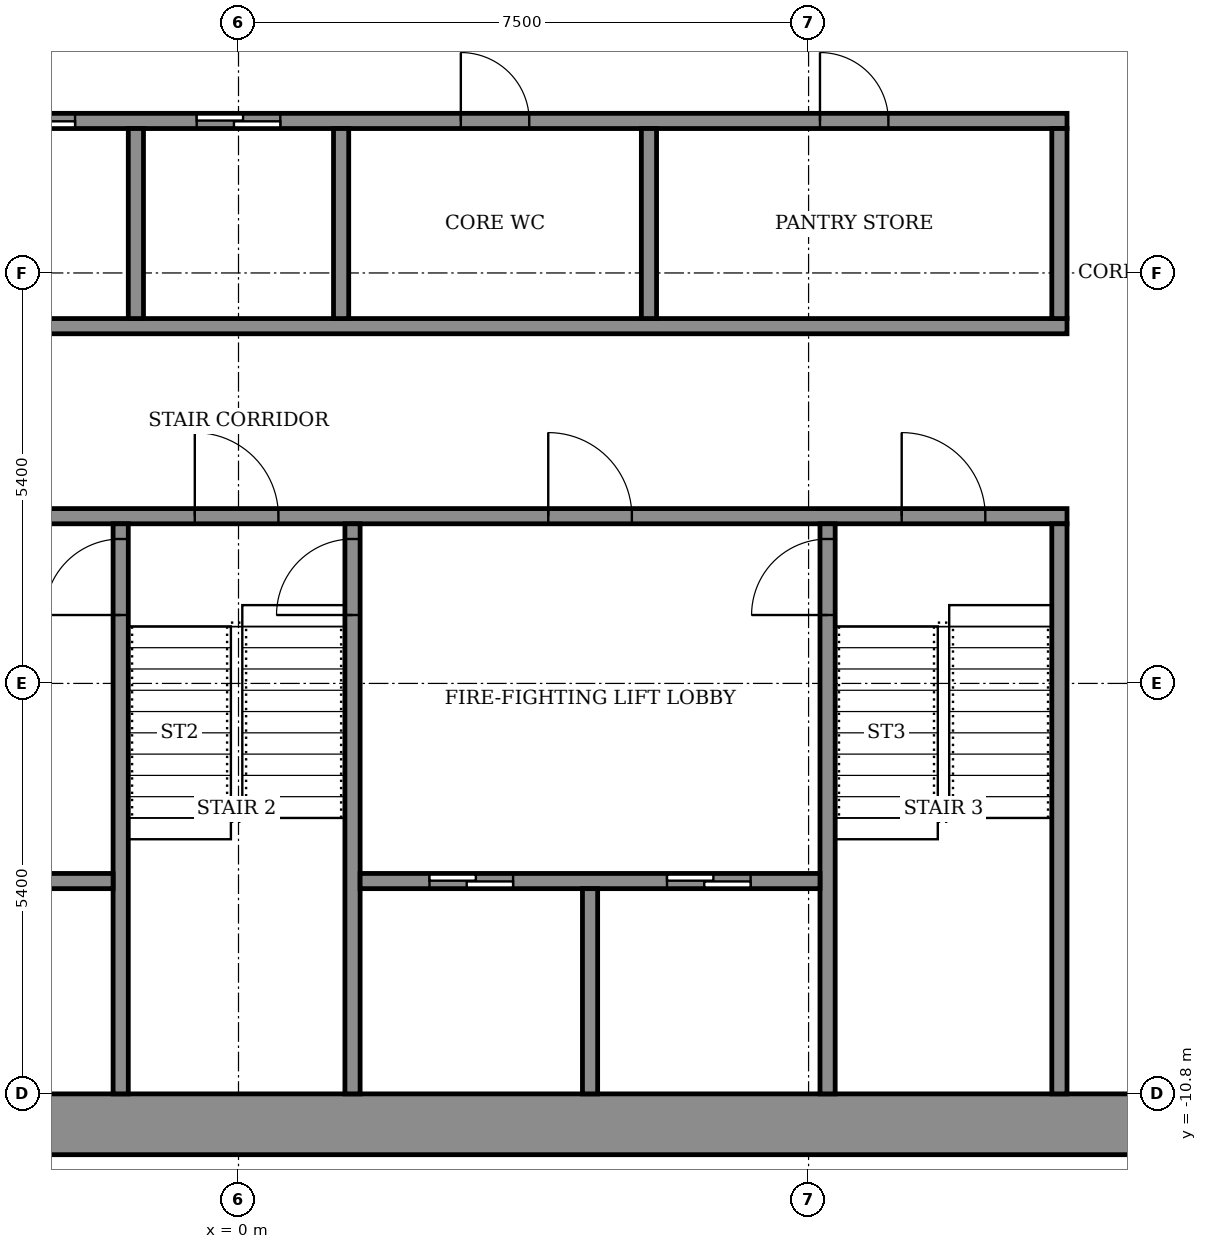
"""IFC4 building model, lengths in metres.
Left out: names, types, materials, properties, quantities, classifications, styles, units other than length and angle.
Written with IfcOpenShell. Run it as: python <this file> out.ifc"""

import sys

from ifc_helpers import new_model, si_unit, direction, frame, frame_2d, origin, place, context, subcontext, project, spatial, rectangle, extrude, element, fill, save


model = new_model("IFC4")
c1 = context("Model", 3, precision=1e-05, world=origin(), true_north=direction((0.0, 1.0)))
c2 = subcontext(c1, "Body", "Model", "MODEL_VIEW")
j1 = project(units=[si_unit("LENGTHUNIT", "METRE"), si_unit("PLANEANGLEUNIT", "RADIAN")], contexts=[c1])
p1 = place(None, origin())
s1 = spatial("IfcSite", under=j1, at=p1, CompositionType="ELEMENT")
p2 = place(p1, origin())
s2 = spatial("IfcBuilding", under=s1, at=p2, CompositionType="ELEMENT")
p3 = place(p2, frame((0.0, 0.0, 238.3)))
s3 = spatial("IfcBuildingStorey", under=s2, at=p3, CompositionType="ELEMENT", Elevation=238.3)
p4 = place(p3, frame((-14.6, -11.2, 0.0), z_axis=(0.0, 0.0, 1.0), x_axis=(1.0, 0.0, 0.0)))
e1 = element("IfcWall", 1, at=p4, inside=s3, PredefinedType="SHEAR", context=c2, shape_type="SweptSolid", body=[
    extrude(rectangle(XDim=29.2, YDim=0.8, at=frame_2d((14.6, 0.0))), origin(), (0.0, 0.0, 1.0), 3.6),
])
p5 = place(p3, frame((-10.9, -3.2, 0.0), z_axis=(0.0, 0.0, 1.0), x_axis=(1.0, 0.0, 0.0)))
e2 = element("IfcWall", 2, at=p5, inside=s3, PredefinedType="SHEAR", context=c2, shape_type="SweptSolid", body=[
    extrude(rectangle(XDim=21.8, YDim=0.2, at=frame_2d((10.9, 0.0))), origin(), (0.0, 0.0, 1.0), 3.05),
])
p6 = place(p5, frame((1.075, 0.0, 0.0)))
e3 = element("IfcOpeningElement", 3, at=p6, cuts=e2, PredefinedType="OPENING", context=c2, shape_type="SweptSolid", body=[
    extrude(rectangle(XDim=1.1, YDim=2.1, at=frame_2d((0.55, 1.05))), frame((0.0, 0.11, 0.0), z_axis=(0.0, -1.0, 0.0), x_axis=(1.0, 0.0, 0.0)), (0.0, 0.0, 1.0), 0.22),
])
p7 = place(p5, frame((10.325, 0.0, 0.0)))
e4 = element("IfcOpeningElement", 4, at=p7, cuts=e2, PredefinedType="OPENING", context=c2, shape_type="SweptSolid", body=[
    extrude(rectangle(XDim=1.1, YDim=2.1, at=frame_2d((0.55, 1.05))), frame((0.0, 0.11, 0.0), z_axis=(0.0, -1.0, 0.0), x_axis=(1.0, 0.0, 0.0)), (0.0, 0.0, 1.0), 0.22),
])
p8 = place(p5, frame((19.625, 0.0, 0.0)))
e5 = element("IfcOpeningElement", 5, at=p8, cuts=e2, PredefinedType="OPENING", context=c2, shape_type="SweptSolid", body=[
    extrude(rectangle(XDim=1.1, YDim=2.1, at=frame_2d((0.55, 1.05))), frame((0.0, 0.11, 0.0), z_axis=(0.0, -1.0, 0.0), x_axis=(1.0, 0.0, 0.0)), (0.0, 0.0, 1.0), 0.22),
])
p9 = place(p5, frame((5.7, 0.0, 0.0)))
e6 = element("IfcOpeningElement", 6, at=p9, cuts=e2, PredefinedType="OPENING", context=c2, shape_type="SweptSolid", body=[
    extrude(rectangle(XDim=1.1, YDim=2.1, at=frame_2d((0.55, 1.05))), frame((0.0, 0.11, 0.0), z_axis=(0.0, -1.0, 0.0), x_axis=(1.0, 0.0, 0.0)), (0.0, 0.0, 1.0), 0.22),
])
p10 = place(p5, frame((14.975, 0.0, 0.0)))
e7 = element("IfcOpeningElement", 7, at=p10, cuts=e2, PredefinedType="OPENING", context=c2, shape_type="SweptSolid", body=[
    extrude(rectangle(XDim=1.1, YDim=2.1, at=frame_2d((0.55, 1.05))), frame((0.0, 0.11, 0.0), z_axis=(0.0, -1.0, 0.0), x_axis=(1.0, 0.0, 0.0)), (0.0, 0.0, 1.0), 0.22),
])
p11 = place(p3, frame((-10.9, -0.7, 0.0), z_axis=(0.0, 0.0, 1.0), x_axis=(1.0, 0.0, 0.0)))
e8 = element("IfcWall", 8, at=p11, inside=s3, PredefinedType="SHEAR", context=c2, shape_type="SweptSolid", body=[
    extrude(rectangle(XDim=21.8, YDim=0.2, at=frame_2d((10.9, 0.0))), origin(), (0.0, 0.0, 1.0), 3.05),
])
p12 = place(p3, frame((-10.9, 2.0, 0.0), z_axis=(0.0, 0.0, 1.0), x_axis=(1.0, 0.0, 0.0)))
e9 = element("IfcWall", 9, at=p12, inside=s3, PredefinedType="SHEAR", context=c2, shape_type="SweptSolid", body=[
    extrude(rectangle(XDim=21.8, YDim=0.2, at=frame_2d((10.9, 0.0))), origin(), (0.0, 0.0, 1.0), 3.05),
])
p13 = place(p12, frame((4.95, 0.0, 0.0)))
e10 = element("IfcOpeningElement", 10, at=p13, cuts=e9, PredefinedType="OPENING", context=c2, shape_type="SweptSolid", body=[
    extrude(rectangle(XDim=1.1, YDim=2.1, at=frame_2d((0.55, 1.05))), frame((0.0, 0.11, 0.0), z_axis=(0.0, -1.0, 0.0), x_axis=(1.0, 0.0, 0.0)), (0.0, 0.0, 1.0), 0.22),
])
p14 = place(p12, frame((7.65, 0.0, 0.0)))
e11 = element("IfcOpeningElement", 11, at=p14, cuts=e9, PredefinedType="OPENING", context=c2, shape_type="SweptSolid", body=[
    extrude(rectangle(XDim=1.1, YDim=2.1, at=frame_2d((0.55, 1.05))), frame((0.0, 0.11, 0.0), z_axis=(0.0, -1.0, 0.0), x_axis=(1.0, 0.0, 0.0)), (0.0, 0.0, 1.0), 0.22),
])
p15 = place(p12, frame((10.35, 0.0, 0.0)))
e12 = element("IfcOpeningElement", 12, at=p15, cuts=e9, PredefinedType="OPENING", context=c2, shape_type="SweptSolid", body=[
    extrude(rectangle(XDim=1.1, YDim=2.1, at=frame_2d((0.55, 1.05))), frame((0.0, 0.11, 0.0), z_axis=(0.0, -1.0, 0.0), x_axis=(1.0, 0.0, 0.0)), (0.0, 0.0, 1.0), 0.22),
])
p16 = place(p12, frame((1.675, 0.0, 0.0)))
e13 = element("IfcOpeningElement", 13, at=p16, cuts=e9, PredefinedType="OPENING", context=c2, shape_type="SweptSolid", body=[
    extrude(rectangle(XDim=0.9, YDim=2.1, at=frame_2d((0.45, 1.05))), frame((0.0, 0.11, 0.0), z_axis=(0.0, -1.0, 0.0), x_axis=(1.0, 0.0, 0.0)), (0.0, 0.0, 1.0), 0.22),
])
p17 = place(p12, frame((13.825, 0.0, 0.0)))
e14 = element("IfcOpeningElement", 14, at=p17, cuts=e9, PredefinedType="OPENING", context=c2, shape_type="SweptSolid", body=[
    extrude(rectangle(XDim=0.9, YDim=2.1, at=frame_2d((0.45, 1.05))), frame((0.0, 0.11, 0.0), z_axis=(0.0, -1.0, 0.0), x_axis=(1.0, 0.0, 0.0)), (0.0, 0.0, 1.0), 0.22),
])
p18 = place(p12, frame((18.55, 0.0, 0.0)))
e15 = element("IfcOpeningElement", 15, at=p18, cuts=e9, PredefinedType="OPENING", context=c2, shape_type="SweptSolid", body=[
    extrude(rectangle(XDim=0.9, YDim=2.1, at=frame_2d((0.45, 1.05))), frame((0.0, 0.11, 0.0), z_axis=(0.0, -1.0, 0.0), x_axis=(1.0, 0.0, 0.0)), (0.0, 0.0, 1.0), 0.22),
])
p19 = place(p3, frame((-1.55, -10.8, 0.0), z_axis=(0.0, 0.0, 1.0), x_axis=(0.0, 1.0, 0.0)))
e16 = element("IfcWall", 16, at=p19, inside=s3, PredefinedType="SHEAR", context=c2, shape_type="SweptSolid", body=[
    extrude(rectangle(XDim=7.5, YDim=0.2, at=frame_2d((3.75, 0.0))), origin(), (0.0, 0.0, 1.0), 3.05),
])
p20 = place(p19, frame((6.3, 0.0, 0.0)))
e17 = element("IfcOpeningElement", 17, at=p20, cuts=e16, PredefinedType="OPENING", context=c2, shape_type="SweptSolid", body=[
    extrude(rectangle(XDim=1.0, YDim=2.1, at=frame_2d((0.5, 1.05))), frame((0.0, 0.11, 0.0), z_axis=(0.0, -1.0, 0.0), x_axis=(1.0, 0.0, 0.0)), (0.0, 0.0, 1.0), 0.22),
])
p21 = place(p3, frame((1.5, -10.8, 0.0), z_axis=(0.0, 0.0, 1.0), x_axis=(0.0, 1.0, 0.0)))
e18 = element("IfcWall", 18, at=p21, inside=s3, PredefinedType="SHEAR", context=c2, shape_type="SweptSolid", body=[
    extrude(rectangle(XDim=7.5, YDim=0.2, at=frame_2d((3.75, 0.0))), origin(), (0.0, 0.0, 1.0), 3.05),
])
p22 = place(p21, frame((6.3, 0.0, 0.0)))
e19 = element("IfcOpeningElement", 19, at=p22, cuts=e18, PredefinedType="OPENING", context=c2, shape_type="SweptSolid", body=[
    extrude(rectangle(XDim=1.0, YDim=2.1, at=frame_2d((0.5, 1.05))), frame((0.0, 0.11, 0.0), z_axis=(0.0, -1.0, 0.0), x_axis=(1.0, 0.0, 0.0)), (0.0, 0.0, 1.0), 0.22),
])
p23 = place(p3, frame((7.75, -10.8, 0.0), z_axis=(0.0, 0.0, 1.0), x_axis=(0.0, 1.0, 0.0)))
e20 = element("IfcWall", 20, at=p23, inside=s3, PredefinedType="SHEAR", context=c2, shape_type="SweptSolid", body=[
    extrude(rectangle(XDim=7.5, YDim=0.2, at=frame_2d((3.75, 0.0))), origin(), (0.0, 0.0, 1.0), 3.05),
])
p24 = place(p23, frame((6.3, 0.0, 0.0)))
e21 = element("IfcOpeningElement", 21, at=p24, cuts=e20, PredefinedType="OPENING", context=c2, shape_type="SweptSolid", body=[
    extrude(rectangle(XDim=1.0, YDim=2.1, at=frame_2d((0.5, 1.05))), frame((0.0, 0.11, 0.0), z_axis=(0.0, -1.0, 0.0), x_axis=(1.0, 0.0, 0.0)), (0.0, 0.0, 1.0), 0.22),
])
p25 = place(p3, frame((10.8, -10.8, 0.0), z_axis=(0.0, 0.0, 1.0), x_axis=(0.0, 1.0, 0.0)))
e22 = element("IfcWall", 22, at=p25, inside=s3, PredefinedType="SHEAR", context=c2, shape_type="SweptSolid", body=[
    extrude(rectangle(XDim=7.5, YDim=0.2, at=frame_2d((3.75, 0.0))), origin(), (0.0, 0.0, 1.0), 3.05),
])
p26 = place(p3, frame((-7.65, -8.0, 0.0), z_axis=(0.0, 0.0, 1.0), x_axis=(1.0, 0.0, 0.0)))
e23 = element("IfcWall", 23, at=p26, inside=s3, PredefinedType="SHEAR", context=c2, shape_type="SweptSolid", body=[
    extrude(rectangle(XDim=6.0, YDim=0.2, at=frame_2d((3.0, 0.0))), origin(), (0.0, 0.0, 1.0), 3.05),
])
p27 = place(p26, frame((0.9, 0.0, 0.0)))
e24 = element("IfcOpeningElement", 24, at=p27, cuts=e23, PredefinedType="OPENING", context=c2, shape_type="SweptSolid", body=[
    extrude(rectangle(XDim=1.1, YDim=2.1, at=frame_2d((0.55, 1.05))), frame((0.0, 0.11, 0.0), z_axis=(0.0, -1.0, 0.0), x_axis=(1.0, 0.0, 0.0)), (0.0, 0.0, 1.0), 0.22),
])
p28 = place(p26, frame((4.0, 0.0, 0.0)))
e25 = element("IfcOpeningElement", 25, at=p28, cuts=e23, PredefinedType="OPENING", context=c2, shape_type="SweptSolid", body=[
    extrude(rectangle(XDim=1.1, YDim=2.1, at=frame_2d((0.55, 1.05))), frame((0.0, 0.11, 0.0), z_axis=(0.0, -1.0, 0.0), x_axis=(1.0, 0.0, 0.0)), (0.0, 0.0, 1.0), 0.22),
])
p29 = place(p3, frame((1.6, -8.0, 0.0), z_axis=(0.0, 0.0, 1.0), x_axis=(1.0, 0.0, 0.0)))
e26 = element("IfcWall", 26, at=p29, inside=s3, PredefinedType="SHEAR", context=c2, shape_type="SweptSolid", body=[
    extrude(rectangle(XDim=6.05, YDim=0.2, at=frame_2d((3.025, 0.0))), origin(), (0.0, 0.0, 1.0), 3.05),
])
p30 = place(p29, frame((0.913, 0.0, 0.0)))
e27 = element("IfcOpeningElement", 27, at=p30, cuts=e26, PredefinedType="OPENING", context=c2, shape_type="SweptSolid", body=[
    extrude(rectangle(XDim=1.1, YDim=2.1, at=frame_2d((0.55, 1.05))), frame((0.0, 0.11, 0.0), z_axis=(0.0, -1.0, 0.0), x_axis=(1.0, 0.0, 0.0)), (0.0, 0.0, 1.0), 0.22),
])
p31 = place(p29, frame((4.038, 0.0, 0.0)))
e28 = element("IfcOpeningElement", 28, at=p31, cuts=e26, PredefinedType="OPENING", context=c2, shape_type="SweptSolid", body=[
    extrude(rectangle(XDim=1.1, YDim=2.1, at=frame_2d((0.55, 1.05))), frame((0.0, 0.11, 0.0), z_axis=(0.0, -1.0, 0.0), x_axis=(1.0, 0.0, 0.0)), (0.0, 0.0, 1.0), 0.22),
])
p32 = place(p3, frame((4.625, -10.8, 0.0), z_axis=(0.0, 0.0, 1.0), x_axis=(0.0, 1.0, 0.0)))
e29 = element("IfcWall", 29, at=p32, inside=s3, PredefinedType="SHEAR", context=c2, shape_type="SweptSolid", body=[
    extrude(rectangle(XDim=2.7, YDim=0.2, at=frame_2d((1.35, 0.0))), origin(), (0.0, 0.0, 1.0), 3.05),
])
for number, where, z_axis, x_axis in (
    (30, (-1.35, -0.6, 0.0), (0.0, 0.0, 1.0), (0.0, 1.0, 0.0)),
    (31, (1.35, -0.6, 0.0), (0.0, 0.0, 1.0), (0.0, 1.0, 0.0)),
):
    element("IfcWall", number, at=place(p3, frame(where, z_axis=z_axis, x_axis=x_axis)), inside=s3, PredefinedType="SHEAR", context=c2, shape_type="SweptSolid", body=[
        extrude(rectangle(XDim=2.5, YDim=0.2, at=frame_2d((1.25, 0.0))), origin(), (0.0, 0.0, 1.0), 3.05),
    ])
for number, where, z_axis, x_axis in (
    (32, (5.4, -0.6, 0.0), (0.0, 0.0, 1.0), (0.0, 1.0, 0.0)),
    (33, (10.8, -0.6, 0.0), (0.0, 0.0, 1.0), (0.0, 1.0, 0.0)),
):
    element("IfcWall", number, at=place(p3, frame(where, z_axis=z_axis, x_axis=x_axis)), inside=s3, PredefinedType="STANDARD", context=c2, shape_type="SweptSolid", body=[
        extrude(rectangle(XDim=2.5, YDim=0.2, at=frame_2d((1.25, 0.0))), origin(), (0.0, 0.0, 1.0), 3.05),
    ])
p33 = place(p14, origin())
e34 = element("IfcDoor", 34, at=p33, inside=s3, OperationType="SLIDING_TO_LEFT", PredefinedType="DOOR", context=c2, shape_type="SweptSolid", body=[
    extrude(rectangle(XDim=1.1, YDim=2.1, at=frame_2d((0.55, 1.05))), frame((0.0, 0.025, 0.0), z_axis=(0.0, -1.0, 0.0), x_axis=(1.0, 0.0, 0.0)), (0.0, 0.0, 1.0), 0.05),
])
fill(e11, e34)
p34 = place(p15, origin())
e35 = element("IfcDoor", 35, at=p34, inside=s3, OperationType="SLIDING_TO_LEFT", PredefinedType="DOOR", context=c2, shape_type="SweptSolid", body=[
    extrude(rectangle(XDim=1.1, YDim=2.1, at=frame_2d((0.55, 1.05))), frame((0.0, 0.025, 0.0), z_axis=(0.0, -1.0, 0.0), x_axis=(1.0, 0.0, 0.0)), (0.0, 0.0, 1.0), 0.05),
])
fill(e12, e35)
p35 = place(p17, origin())
e36 = element("IfcDoor", 36, at=p35, inside=s3, OperationType="SINGLE_SWING_RIGHT", PredefinedType="DOOR", context=c2, shape_type="SweptSolid", body=[
    extrude(rectangle(XDim=0.9, YDim=2.1, at=frame_2d((0.45, 1.05))), frame((0.0, 0.025, 0.0), z_axis=(0.0, -1.0, 0.0), x_axis=(1.0, 0.0, 0.0)), (0.0, 0.0, 1.0), 0.05),
])
fill(e14, e36)
p36 = place(p18, origin())
e37 = element("IfcDoor", 37, at=p36, inside=s3, OperationType="SINGLE_SWING_RIGHT", PredefinedType="DOOR", context=c2, shape_type="SweptSolid", body=[
    extrude(rectangle(XDim=0.9, YDim=2.1, at=frame_2d((0.45, 1.05))), frame((0.0, 0.025, 0.0), z_axis=(0.0, -1.0, 0.0), x_axis=(1.0, 0.0, 0.0)), (0.0, 0.0, 1.0), 0.05),
])
fill(e15, e37)
p37 = place(p30, origin())
e38 = element("IfcDoor", 38, at=p37, inside=s3, OperationType="SLIDING_TO_LEFT", PredefinedType="DOOR", context=c2, shape_type="SweptSolid", body=[
    extrude(rectangle(XDim=1.1, YDim=2.1, at=frame_2d((0.55, 1.05))), frame((0.0, 0.025, 0.0), z_axis=(0.0, -1.0, 0.0), x_axis=(1.0, 0.0, 0.0)), (0.0, 0.0, 1.0), 0.05),
])
fill(e27, e38)
p38 = place(p31, origin())
e39 = element("IfcDoor", 39, at=p38, inside=s3, OperationType="SLIDING_TO_LEFT", PredefinedType="DOOR", context=c2, shape_type="SweptSolid", body=[
    extrude(rectangle(XDim=1.1, YDim=2.1, at=frame_2d((0.55, 1.05))), frame((0.0, 0.025, 0.0), z_axis=(0.0, -1.0, 0.0), x_axis=(1.0, 0.0, 0.0)), (0.0, 0.0, 1.0), 0.05),
])
fill(e28, e39)
p39 = place(p7, origin())
e40 = element("IfcDoor", 40, at=p39, inside=s3, OperationType="SINGLE_SWING_RIGHT", PredefinedType="DOOR", context=c2, shape_type="SweptSolid", body=[
    extrude(rectangle(XDim=1.1, YDim=2.1, at=frame_2d((0.55, 1.05))), frame((0.0, 0.025, 0.0), z_axis=(0.0, -1.0, 0.0), x_axis=(1.0, 0.0, 0.0)), (0.0, 0.0, 1.0), 0.05),
])
fill(e4, e40)
p40 = place(p8, origin())
e41 = element("IfcDoor", 41, at=p40, inside=s3, OperationType="SINGLE_SWING_RIGHT", PredefinedType="DOOR", context=c2, shape_type="SweptSolid", body=[
    extrude(rectangle(XDim=1.1, YDim=2.1, at=frame_2d((0.55, 1.05))), frame((0.0, 0.025, 0.0), z_axis=(0.0, -1.0, 0.0), x_axis=(1.0, 0.0, 0.0)), (0.0, 0.0, 1.0), 0.05),
])
fill(e5, e41)
p41 = place(p10, origin())
e42 = element("IfcDoor", 42, at=p41, inside=s3, OperationType="SINGLE_SWING_LEFT", PredefinedType="DOOR", context=c2, shape_type="SweptSolid", body=[
    extrude(rectangle(XDim=1.1, YDim=2.1, at=frame_2d((0.55, 1.05))), frame((0.0, 0.025, 0.0), z_axis=(0.0, -1.0, 0.0), x_axis=(1.0, 0.0, 0.0)), (0.0, 0.0, 1.0), 0.05),
])
fill(e7, e42)
p42 = place(p20, origin())
e43 = element("IfcDoor", 43, at=p42, inside=s3, OperationType="SINGLE_SWING_RIGHT", PredefinedType="DOOR", context=c2, shape_type="SweptSolid", body=[
    extrude(rectangle(XDim=1.0, YDim=2.1, at=frame_2d((0.5, 1.05))), frame((0.0, 0.025, 0.0), z_axis=(0.0, -1.0, 0.0), x_axis=(1.0, 0.0, 0.0)), (0.0, 0.0, 1.0), 0.05),
])
fill(e17, e43)
p43 = place(p22, origin())
e44 = element("IfcDoor", 44, at=p43, inside=s3, OperationType="SINGLE_SWING_RIGHT", PredefinedType="DOOR", context=c2, shape_type="SweptSolid", body=[
    extrude(rectangle(XDim=1.0, YDim=2.1, at=frame_2d((0.5, 1.05))), frame((0.0, 0.025, 0.0), z_axis=(0.0, -1.0, 0.0), x_axis=(1.0, 0.0, 0.0)), (0.0, 0.0, 1.0), 0.05),
])
fill(e19, e44)
p44 = place(p24, origin())
e45 = element("IfcDoor", 45, at=p44, inside=s3, OperationType="SINGLE_SWING_RIGHT", PredefinedType="DOOR", context=c2, shape_type="SweptSolid", body=[
    extrude(rectangle(XDim=1.0, YDim=2.1, at=frame_2d((0.5, 1.05))), frame((0.0, 0.025, 0.0), z_axis=(0.0, -1.0, 0.0), x_axis=(1.0, 0.0, 0.0)), (0.0, 0.0, 1.0), 0.05),
])
fill(e21, e45)
save(model, sys.argv[1])
